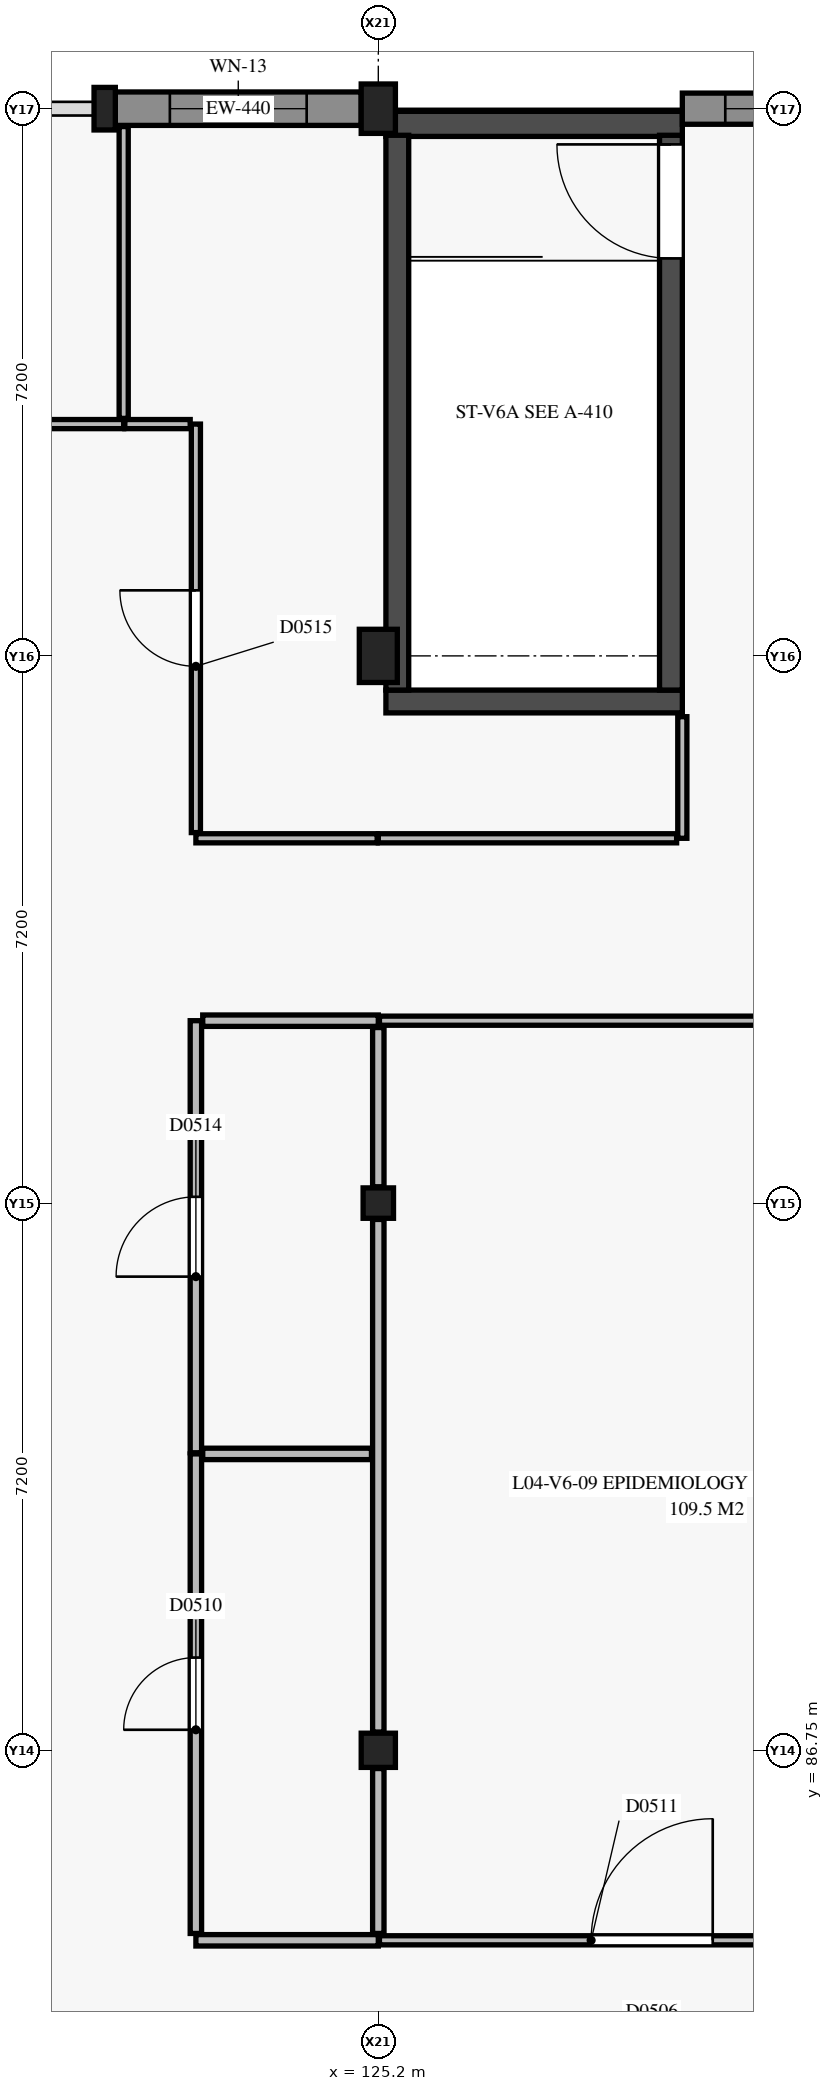
"""IFC4 building model, lengths in metres.
Left out: names, types, materials, properties, quantities, classifications, styles, units other than length and angle.
Written with IfcOpenShell. Run it as: python <this file> out.ifc"""

import sys

from ifc_helpers import new_model, si_unit, direction, frame, frame_2d, origin, origin_2d, place, context, subcontext, project, spatial, rectangle, extrude, element, fill, save


model = new_model("IFC4")
c1 = context("Model", 3, precision=1e-05, world=origin(), true_north=direction((0.0, 1.0)))
c2 = subcontext(c1, "Body", "Model", "MODEL_VIEW")
j1 = project(units=[si_unit("LENGTHUNIT", "METRE"), si_unit("PLANEANGLEUNIT", "RADIAN")], contexts=[c1])
p1 = place(None, origin())
s1 = spatial("IfcSite", under=j1, at=p1, CompositionType="ELEMENT")
p2 = place(p1, origin())
s2 = spatial("IfcBuilding", under=s1, at=p2, CompositionType="ELEMENT")
p3 = place(p2, frame((0.0, 0.0, 17.4)))
s3 = spatial("IfcBuildingStorey", under=s2, at=p3, CompositionType="ELEMENT", Elevation=17.4)
p4 = place(p3, frame((125.2, 86.75, 0.0), z_axis=(0.0, 0.0, 1.0), x_axis=(1.0, 0.0, 0.0)))
e1 = element("IfcColumn", 1, at=p4, inside=s3, PredefinedType="COLUMN", context=c2, shape_type="SweptSolid", body=[
    extrude(rectangle(XDim=0.45, YDim=0.45, at=origin_2d()), origin(), (0.0, 0.0, 1.0), 4.05),
])
p5 = place(p3, frame((125.2, 93.95, 0.0), z_axis=(0.0, 0.0, 1.0), x_axis=(1.0, 0.0, 0.0)))
e2 = element("IfcColumn", 2, at=p5, inside=s3, PredefinedType="COLUMN", context=c2, shape_type="SweptSolid", body=[
    extrude(rectangle(XDim=0.4, YDim=0.4, at=origin_2d()), origin(), (0.0, 0.0, 1.0), 4.36),
])
p6 = place(p3, frame((125.2, 101.15, 0.0), z_axis=(0.0, 0.0, 1.0), x_axis=(1.0, 0.0, 0.0)))
e3 = element("IfcColumn", 3, at=p6, inside=s3, PredefinedType="COLUMN", context=c2, shape_type="SweptSolid", body=[
    extrude(rectangle(XDim=0.5, YDim=0.7, at=origin_2d()), origin(), (0.0, 0.0, 1.0), 4.05),
])
p7 = place(p3, frame((125.2, 108.35, 0.0), z_axis=(0.0, 0.0, 1.0), x_axis=(1.0, 0.0, 0.0)))
e4 = element("IfcColumn", 4, at=p7, inside=s3, PredefinedType="COLUMN", context=c2, shape_type="SweptSolid", body=[
    extrude(rectangle(XDim=0.45, YDim=0.65, at=origin_2d()), origin(), (0.0, 0.0, 1.0), 4.36),
])
p8 = place(p3, frame((121.6, 108.35, 0.0), z_axis=(0.0, 0.0, 1.0), x_axis=(1.0, 0.0, 0.0)))
e5 = element("IfcColumn", 5, at=p8, inside=s3, PredefinedType="PILASTER", context=c2, shape_type="SweptSolid", body=[
    extrude(rectangle(XDim=0.28, YDim=0.56, at=origin_2d()), origin(), (0.0, 0.0, 1.0), 4.2),
])
p9 = place(p3, frame((125.3, 100.55, 0.0), z_axis=(0.0, 0.0, 1.0), x_axis=(1.0, 0.0, 0.0)))
e6 = element("IfcWall", 6, at=p9, inside=s3, PredefinedType="SHEAR", context=c2, shape_type="SweptSolid", body=[
    extrude(rectangle(XDim=3.9, YDim=0.3, at=frame_2d((1.95, 0.0))), origin(), (0.0, 0.0, 1.0), 4.2),
])
p10 = place(p3, frame((125.3, 108.15, 0.0), z_axis=(0.0, 0.0, 1.0), x_axis=(1.0, 0.0, 0.0)))
e7 = element("IfcWall", 7, at=p10, inside=s3, PredefinedType="SHEAR", context=c2, shape_type="SweptSolid", body=[
    extrude(rectangle(XDim=3.9, YDim=0.33, at=frame_2d((1.95, 0.0))), origin(), (0.0, 0.0, 1.0), 4.2),
])
p11 = place(p3, frame((125.45, 100.7, 0.0), z_axis=(0.0, 0.0, 1.0), x_axis=(0.0, 1.0, 0.0)))
e8 = element("IfcWall", 8, at=p11, inside=s3, PredefinedType="SHEAR", context=c2, shape_type="SweptSolid", body=[
    extrude(rectangle(XDim=7.3, YDim=0.3, at=frame_2d((3.65, 0.0))), origin(), (0.0, 0.0, 1.0), 4.2),
])
p12 = place(p3, frame((129.05, 100.7, 0.0), z_axis=(0.0, 0.0, 1.0), x_axis=(0.0, 1.0, 0.0)))
e9 = element("IfcWall", 9, at=p12, inside=s3, PredefinedType="SHEAR", context=c2, shape_type="SweptSolid", body=[
    extrude(rectangle(XDim=7.3, YDim=0.3, at=frame_2d((3.65, 0.0))), origin(), (0.0, 0.0, 1.0), 4.2),
])
p13 = place(p12, frame((5.68, 0.0, 0.0)))
e10 = element("IfcOpeningElement", 10, at=p13, cuts=e9, PredefinedType="OPENING", context=c2, shape_type="SweptSolid", body=[
    extrude(rectangle(XDim=1.5, YDim=2.15, at=frame_2d((0.75, 1.075))), frame((0.0, 0.16, 0.0), z_axis=(0.0, -1.0, 0.0), x_axis=(1.0, 0.0, 0.0)), (0.0, 0.0, 1.0), 0.32),
])
p14 = place(p3, frame((121.74, 108.35, 0.0), z_axis=(0.0, 0.0, 1.0), x_axis=(1.0, 0.0, 0.0)))
e11 = element("IfcWall", 11, at=p14, inside=s3, PredefinedType="USERDEFINED", context=c2, shape_type="SweptSolid", body=[
    extrude(rectangle(XDim=3.235, YDim=0.44, at=frame_2d((1.618, 0.0))), origin(), (0.0, 0.0, 1.0), 3.38),
])
p15 = place(p14, frame((0.718, 0.0, 0.9)))
e12 = element("IfcOpeningElement", 12, at=p15, cuts=e11, PredefinedType="OPENING", context=c2, shape_type="SweptSolid", body=[
    extrude(rectangle(XDim=1.8, YDim=1.5, at=frame_2d((0.9, 0.75))), frame((0.0, 0.23, 0.0), z_axis=(0.0, -1.0, 0.0), x_axis=(1.0, 0.0, 0.0)), (0.0, 0.0, 1.0), 0.46),
])
p16 = place(p3, frame((129.2, 108.35, 0.0), z_axis=(0.0, 0.0, 1.0), x_axis=(1.0, 0.0, 0.0)))
e13 = element("IfcWall", 13, at=p16, inside=s3, PredefinedType="USERDEFINED", context=c2, shape_type="SweptSolid", body=[
    extrude(rectangle(XDim=2.925, YDim=0.41, at=frame_2d((1.462, 0.0))), origin(), (0.0, 0.0, 1.0), 3.38),
])
p17 = place(p16, frame((0.565, 0.0, 0.6)))
e14 = element("IfcOpeningElement", 14, at=p17, cuts=e13, PredefinedType="OPENING", context=c2, shape_type="SweptSolid", body=[
    extrude(rectangle(XDim=1.2, YDim=2.2, at=frame_2d((0.6, 1.1))), frame((0.0, 0.215, 0.0), z_axis=(0.0, -1.0, 0.0), x_axis=(1.0, 0.0, 0.0)), (0.0, 0.0, 1.0), 0.43),
])
p18 = place(p3, frame((122.8, 84.25, 0.0), z_axis=(0.0, 0.0, 1.0), x_axis=(1.0, 0.0, 0.0)))
e15 = element("IfcWall", 15, at=p18, inside=s3, PredefinedType="PARTITIONING", context=c2, shape_type="SweptSolid", body=[
    extrude(rectangle(XDim=2.4, YDim=0.15, at=frame_2d((1.2, 0.0))), origin(), (0.0, 0.0, 1.0), 3.95),
])
p19 = place(p3, frame((122.8, 84.34, 0.0), z_axis=(0.0, 0.0, 1.0), x_axis=(0.0, 1.0, 0.0)))
e16 = element("IfcWall", 16, at=p19, inside=s3, PredefinedType="PARTITIONING", context=c2, shape_type="SweptSolid", body=[
    extrude(rectangle(XDim=6.31, YDim=0.15, at=frame_2d((3.155, 0.0))), origin(), (0.0, 0.0, 1.0), 3.32),
])
p20 = place(p19, frame((2.68, 0.0, 0.0)))
e17 = element("IfcOpeningElement", 17, at=p20, cuts=e16, PredefinedType="OPENING", context=c2, shape_type="SweptSolid", body=[
    extrude(rectangle(XDim=0.95, YDim=2.1, at=frame_2d((0.475, 1.05))), frame((0.0, 0.085, 0.0), z_axis=(0.0, -1.0, 0.0), x_axis=(1.0, 0.0, 0.0)), (0.0, 0.0, 1.0), 0.17),
])
p21 = place(p3, frame((122.8, 90.665, 0.0), z_axis=(0.0, 0.0, 1.0), x_axis=(0.0, 1.0, 0.0)))
e18 = element("IfcWall", 18, at=p21, inside=s3, PredefinedType="PARTITIONING", context=c2, shape_type="SweptSolid", body=[
    extrude(rectangle(XDim=5.685, YDim=0.15, at=frame_2d((2.843, 0.0))), origin(), (0.0, 0.0, 1.0), 3.44),
])
p22 = place(p21, frame((2.317, 0.0, 0.0)))
e19 = element("IfcOpeningElement", 19, at=p22, cuts=e18, PredefinedType="OPENING", context=c2, shape_type="SweptSolid", body=[
    extrude(rectangle(XDim=1.05, YDim=2.15, at=frame_2d((0.525, 1.075))), frame((0.0, 0.085, 0.0), z_axis=(0.0, -1.0, 0.0), x_axis=(1.0, 0.0, 0.0)), (0.0, 0.0, 1.0), 0.17),
])
p23 = place(p3, frame((122.89, 96.35, 0.0), z_axis=(0.0, 0.0, 1.0), x_axis=(1.0, 0.0, 0.0)))
e20 = element("IfcWall", 20, at=p23, inside=s3, PredefinedType="PARTITIONING", context=c2, shape_type="SweptSolid", body=[
    extrude(rectangle(XDim=2.31, YDim=0.15, at=frame_2d((1.155, 0.0))), origin(), (0.0, 0.0, 1.0), 3.95),
])
p24 = place(p3, frame((125.215, 84.25, 0.0), z_axis=(0.0, 0.0, 1.0), x_axis=(1.0, 0.0, 0.0)))
e21 = element("IfcWall", 21, at=p24, inside=s3, PredefinedType="PARTITIONING", context=c2, shape_type="SweptSolid", body=[
    extrude(rectangle(XDim=7.17, YDim=0.12, at=frame_2d((3.585, 0.0))), origin(), (0.0, 0.0, 1.0), 3.95),
])
p25 = place(p24, frame((2.785, 0.0, 0.0)))
e22 = element("IfcOpeningElement", 22, at=p25, cuts=e21, PredefinedType="OPENING", context=c2, shape_type="SweptSolid", body=[
    extrude(rectangle(XDim=1.6, YDim=2.25, at=frame_2d((0.8, 1.125))), frame((0.0, 0.07, 0.0), z_axis=(0.0, -1.0, 0.0), x_axis=(1.0, 0.0, 0.0)), (0.0, 0.0, 1.0), 0.14),
])
p26 = place(p3, frame((125.215, 96.35, 0.0), z_axis=(0.0, 0.0, 1.0), x_axis=(1.0, 0.0, 0.0)))
e23 = element("IfcWall", 23, at=p26, inside=s3, PredefinedType="PARTITIONING", context=c2, shape_type="SweptSolid", body=[
    extrude(rectangle(XDim=6.385, YDim=0.12, at=frame_2d((3.192, 0.0))), origin(), (0.0, 0.0, 1.0), 3.95),
])
p27 = place(p3, frame((120.4, 104.2, 0.0), z_axis=(0.0, 0.0, 1.0), x_axis=(1.0, 0.0, 0.0)))
e24 = element("IfcWall", 24, at=p27, inside=s3, PredefinedType="PARTITIONING", context=c2, shape_type="SweptSolid", body=[
    extrude(rectangle(XDim=1.45, YDim=0.12, at=frame_2d((0.725, 0.0))), origin(), (0.0, 0.0, 1.0), 3.95),
])
p28 = place(p3, frame((129.2, 98.75, 0.0), z_axis=(0.0, 0.0, 1.0), x_axis=(0.0, 1.0, 0.0)))
e25 = element("IfcWall", 25, at=p28, inside=s3, PredefinedType="PARTITIONING", context=c2, shape_type="SweptSolid", body=[
    extrude(rectangle(XDim=1.6, YDim=0.12, at=frame_2d((0.8, 0.0))), origin(), (0.0, 0.0, 1.0), 3.95),
])
p29 = place(p3, frame((125.2, 98.75, 0.0), z_axis=(0.0, 0.0, 1.0), x_axis=(1.0, 0.0, 0.0)))
e26 = element("IfcWall", 26, at=p29, inside=s3, PredefinedType="PARTITIONING", context=c2, shape_type="SweptSolid", body=[
    extrude(rectangle(XDim=3.925, YDim=0.12, at=frame_2d((1.962, 0.0))), origin(), (0.0, 0.0, 1.0), 3.95),
])
p30 = place(p3, frame((122.8, 98.75, 0.0), z_axis=(0.0, 0.0, 1.0), x_axis=(1.0, 0.0, 0.0)))
e27 = element("IfcWall", 27, at=p30, inside=s3, PredefinedType="PARTITIONING", context=c2, shape_type="SweptSolid", body=[
    extrude(rectangle(XDim=2.385, YDim=0.12, at=frame_2d((1.192, 0.0))), origin(), (0.0, 0.0, 1.0), 3.95),
])
p31 = place(p3, frame((122.8, 98.825, 0.0), z_axis=(0.0, 0.0, 1.0), x_axis=(0.0, 1.0, 0.0)))
e28 = element("IfcWall", 28, at=p31, inside=s3, PredefinedType="PARTITIONING", context=c2, shape_type="SweptSolid", body=[
    extrude(rectangle(XDim=5.375, YDim=0.12, at=frame_2d((2.688, 0.0))), origin(), (0.0, 0.0, 1.0), 3.22),
])
p32 = place(p31, frame((2.188, 0.0, 0.0)))
e29 = element("IfcOpeningElement", 29, at=p32, cuts=e28, PredefinedType="OPENING", context=c2, shape_type="SweptSolid", body=[
    extrude(rectangle(XDim=1.0, YDim=2.15, at=frame_2d((0.5, 1.075))), frame((0.0, 0.07, 0.0), z_axis=(0.0, -1.0, 0.0), x_axis=(1.0, 0.0, 0.0)), (0.0, 0.0, 1.0), 0.14),
])
p33 = place(p3, frame((121.865, 104.2, 0.0), z_axis=(0.0, 0.0, 1.0), x_axis=(1.0, 0.0, 0.0)))
e30 = element("IfcWall", 30, at=p33, inside=s3, PredefinedType="PARTITIONING", context=c2, shape_type="SweptSolid", body=[
    extrude(rectangle(XDim=0.86, YDim=0.12, at=frame_2d((0.43, 0.0))), origin(), (0.0, 0.0, 1.0), 3.95),
])
p34 = place(p3, frame((125.2, 84.34, 0.0), z_axis=(0.0, 0.0, 1.0), x_axis=(0.0, 1.0, 0.0)))
e31 = element("IfcWall", 31, at=p34, inside=s3, PredefinedType="PARTITIONING", context=c2, shape_type="SweptSolid", body=[
    extrude(rectangle(XDim=2.17, YDim=0.15, at=frame_2d((1.085, 0.0))), origin(), (0.0, 0.0, 1.0), 3.95),
])
p35 = place(p3, frame((125.2, 86.99, 0.0), z_axis=(0.0, 0.0, 1.0), x_axis=(0.0, 1.0, 0.0)))
e32 = element("IfcWall", 32, at=p35, inside=s3, PredefinedType="PARTITIONING", context=c2, shape_type="SweptSolid", body=[
    extrude(rectangle(XDim=6.745, YDim=0.15, at=frame_2d((3.373, 0.0))), origin(), (0.0, 0.0, 1.0), 3.95),
])
p36 = place(p3, frame((125.2, 94.165, 0.0), z_axis=(0.0, 0.0, 1.0), x_axis=(0.0, 1.0, 0.0)))
e33 = element("IfcWall", 33, at=p36, inside=s3, PredefinedType="PARTITIONING", context=c2, shape_type="SweptSolid", body=[
    extrude(rectangle(XDim=2.095, YDim=0.15, at=frame_2d((1.047, 0.0))), origin(), (0.0, 0.0, 1.0), 3.95),
])
p37 = place(p3, frame((122.89, 90.65, 0.0), z_axis=(0.0, 0.0, 1.0), x_axis=(1.0, 0.0, 0.0)))
e34 = element("IfcWall", 34, at=p37, inside=s3, PredefinedType="PARTITIONING", context=c2, shape_type="SweptSolid", body=[
    extrude(rectangle(XDim=2.22, YDim=0.15, at=frame_2d((1.11, 0.0))), origin(), (0.0, 0.0, 1.0), 3.95),
])
p38 = place(p3, frame((121.85, 104.275, 0.0), z_axis=(0.0, 0.0, 1.0), x_axis=(0.0, 1.0, 0.0)))
e35 = element("IfcWall", 35, at=p38, inside=s3, PredefinedType="PARTITIONING", context=c2, shape_type="SweptSolid", body=[
    extrude(rectangle(XDim=3.84, YDim=0.12, at=frame_2d((1.92, 0.0))), origin(), (0.0, 0.0, 1.0), 3.95),
])
p39 = place(p15, origin())
e36 = element("IfcWindow", 36, at=p39, inside=s3, PartitioningType="SINGLE_PANEL", PredefinedType="WINDOW", context=c2, shape_type="SweptSolid", body=[
    extrude(rectangle(XDim=1.8, YDim=1.5, at=frame_2d((0.9, 0.75))), frame((0.0, 0.03, 0.0), z_axis=(0.0, -1.0, 0.0), x_axis=(1.0, 0.0, 0.0)), (0.0, 0.0, 1.0), 0.06),
])
fill(e12, e36)
p40 = place(p17, origin())
e37 = element("IfcWindow", 37, at=p40, inside=s3, PartitioningType="SINGLE_PANEL", PredefinedType="WINDOW", context=c2, shape_type="SweptSolid", body=[
    extrude(rectangle(XDim=1.2, YDim=2.2, at=frame_2d((0.6, 1.1))), frame((0.0, 0.03, 0.0), z_axis=(0.0, -1.0, 0.0), x_axis=(1.0, 0.0, 0.0)), (0.0, 0.0, 1.0), 0.06),
])
fill(e14, e37)
p41 = place(p13, origin())
e38 = element("IfcDoor", 38, at=p41, inside=s3, OperationType="SINGLE_SWING_RIGHT", PredefinedType="DOOR", context=c2, shape_type="SweptSolid", body=[
    extrude(rectangle(XDim=1.5, YDim=2.15, at=frame_2d((0.75, 1.075))), frame((0.0, 0.025, 0.0), z_axis=(0.0, -1.0, 0.0), x_axis=(1.0, 0.0, 0.0)), (0.0, 0.0, 1.0), 0.05),
])
fill(e10, e38)
p42 = place(p20, origin())
e39 = element("IfcDoor", 39, at=p42, inside=s3, OperationType="SINGLE_SWING_LEFT", PredefinedType="DOOR", context=c2, shape_type="SweptSolid", body=[
    extrude(rectangle(XDim=0.95, YDim=2.1, at=frame_2d((0.475, 1.05))), frame((0.0, 0.025, 0.0), z_axis=(0.0, -1.0, 0.0), x_axis=(1.0, 0.0, 0.0)), (0.0, 0.0, 1.0), 0.05),
])
fill(e17, e39)
p43 = place(p25, origin())
e40 = element("IfcDoor", 40, at=p43, inside=s3, OperationType="SINGLE_SWING_RIGHT", PredefinedType="DOOR", context=c2, shape_type="SweptSolid", body=[
    extrude(rectangle(XDim=1.6, YDim=2.25, at=frame_2d((0.8, 1.125))), frame((0.0, 0.025, 0.0), z_axis=(0.0, -1.0, 0.0), x_axis=(1.0, 0.0, 0.0)), (0.0, 0.0, 1.0), 0.05),
])
fill(e22, e40)
p44 = place(p22, origin())
e41 = element("IfcDoor", 41, at=p44, inside=s3, OperationType="SINGLE_SWING_LEFT", PredefinedType="DOOR", context=c2, shape_type="SweptSolid", body=[
    extrude(rectangle(XDim=1.05, YDim=2.15, at=frame_2d((0.525, 1.075))), frame((0.0, 0.025, 0.0), z_axis=(0.0, -1.0, 0.0), x_axis=(1.0, 0.0, 0.0)), (0.0, 0.0, 1.0), 0.05),
])
fill(e19, e41)
p45 = place(p32, origin())
e42 = element("IfcDoor", 42, at=p45, inside=s3, OperationType="SINGLE_SWING_RIGHT", PredefinedType="DOOR", context=c2, shape_type="SweptSolid", body=[
    extrude(rectangle(XDim=1.0, YDim=2.15, at=frame_2d((0.5, 1.075))), frame((0.0, 0.025, 0.0), z_axis=(0.0, -1.0, 0.0), x_axis=(1.0, 0.0, 0.0)), (0.0, 0.0, 1.0), 0.05),
])
fill(e29, e42)
save(model, sys.argv[1])
